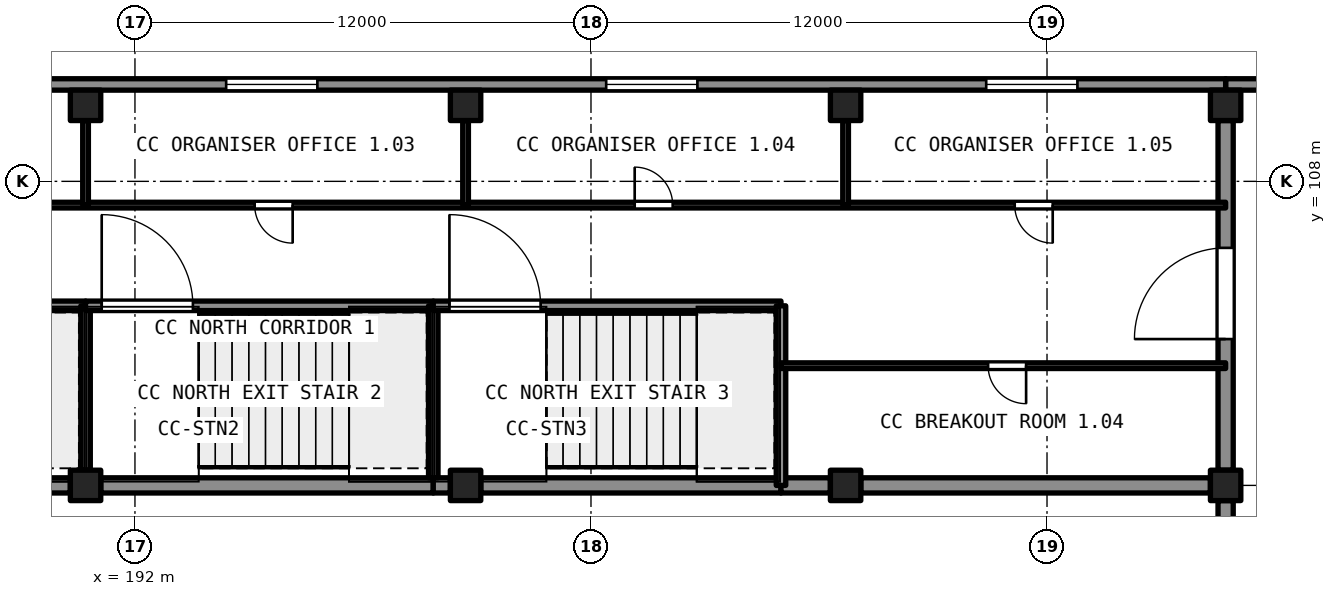
"""IFC4 building model, lengths in metres.
Left out: names, types, materials, properties, quantities, classifications, styles, units other than length and angle.
Written with IfcOpenShell. Run it as: python <this file> out.ifc"""

import sys

from ifc_helpers import new_model, si_unit, direction, frame, frame_2d, origin, origin_2d, place, context, subcontext, project, spatial, rectangle, extrude, element, fill, save


model = new_model("IFC4")
c1 = context("Model", 3, precision=1e-05, world=origin(), true_north=direction((0.0, 1.0)))
c2 = subcontext(c1, "Body", "Model", "MODEL_VIEW")
j1 = project(units=[si_unit("LENGTHUNIT", "METRE"), si_unit("PLANEANGLEUNIT", "RADIAN")], contexts=[c1])
p1 = place(None, origin())
s1 = spatial("IfcSite", under=j1, at=p1, CompositionType="ELEMENT")
p2 = place(p1, origin())
s2 = spatial("IfcBuilding", under=s1, at=p2, CompositionType="ELEMENT")
p3 = place(p2, frame((0.0, 0.0, 9.0)))
s3 = spatial("IfcBuildingStorey", under=s2, at=p3, CompositionType="ELEMENT", Elevation=9.0)
for number, where, z_axis, x_axis in (
    (1, (190.7, 100.0, 0.0), (0.0, 0.0, 1.0), (1.0, 0.0, 0.0)),
    (2, (190.7, 110.0, 0.0), (0.0, 0.0, 1.0), (1.0, 0.0, 0.0)),
    (3, (200.7, 100.0, 0.0), (0.0, 0.0, 1.0), (1.0, 0.0, 0.0)),
    (4, (200.7, 110.0, 0.0), (0.0, 0.0, 1.0), (1.0, 0.0, 0.0)),
    (5, (210.7, 100.0, 0.0), (0.0, 0.0, 1.0), (1.0, 0.0, 0.0)),
    (6, (210.7, 110.0, 0.0), (0.0, 0.0, 1.0), (1.0, 0.0, 0.0)),
    (7, (220.7, 100.0, 0.0), (0.0, 0.0, 1.0), (1.0, 0.0, 0.0)),
    (8, (220.7, 110.0, 0.0), (0.0, 0.0, 1.0), (1.0, 0.0, 0.0)),
):
    element("IfcColumn", number, at=place(p3, frame(where, z_axis=z_axis, x_axis=x_axis)), inside=s3, PredefinedType="COLUMN", context=c2, shape_type="SweptSolid", body=[
        extrude(rectangle(XDim=0.8, YDim=0.8, at=origin_2d()), origin(), (0.0, 0.0, 1.0), 6.0),
    ])
for number, where, z_axis, x_axis in (
    (9, (181.55, 100.0, 0.0), (0.0, 0.0, 1.0), (1.0, 0.0, 0.0)),
    (10, (191.1, 100.0, 0.0), (0.0, 0.0, 1.0), (1.0, 0.0, 0.0)),
):
    element("IfcWall", number, at=place(p3, frame(where, z_axis=z_axis, x_axis=x_axis)), inside=s3, PredefinedType="SHEAR", context=c2, shape_type="SweptSolid", body=[
        extrude(rectangle(XDim=8.75, YDim=0.4, at=frame_2d((4.375, 0.0))), origin(), (0.0, 0.0, 1.0), 5.59),
    ])
p4 = place(p3, frame((199.85, 100.0, 0.0), z_axis=(0.0, 0.0, 1.0), x_axis=(1.0, 0.0, 0.0)))
e11 = element("IfcWall", 11, at=p4, inside=s3, PredefinedType="SHEAR", context=c2, shape_type="SweptSolid", body=[
    extrude(rectangle(XDim=0.45, YDim=0.4, at=frame_2d((0.225, 0.0))), origin(), (0.0, 0.0, 1.0), 5.59),
])
p5 = place(p3, frame((201.1, 100.0, 0.0), z_axis=(0.0, 0.0, 1.0), x_axis=(1.0, 0.0, 0.0)))
e12 = element("IfcWall", 12, at=p5, inside=s3, PredefinedType="SHEAR", context=c2, shape_type="SweptSolid", body=[
    extrude(rectangle(XDim=7.9, YDim=0.4, at=frame_2d((3.95, 0.0))), origin(), (0.0, 0.0, 1.0), 5.59),
])
p6 = place(p3, frame((209.0, 100.0, 0.0), z_axis=(0.0, 0.0, 1.0), x_axis=(1.0, 0.0, 0.0)))
e13 = element("IfcWall", 13, at=p6, inside=s3, PredefinedType="SHEAR", context=c2, shape_type="SweptSolid", body=[
    extrude(rectangle(XDim=1.3, YDim=0.4, at=frame_2d((0.65, 0.0))), origin(), (0.0, 0.0, 1.0), 5.59),
])
p7 = place(p3, frame((211.1, 100.0, 0.0), z_axis=(0.0, 0.0, 1.0), x_axis=(1.0, 0.0, 0.0)))
e14 = element("IfcWall", 14, at=p7, inside=s3, PredefinedType="SHEAR", context=c2, shape_type="SweptSolid", body=[
    extrude(rectangle(XDim=9.2, YDim=0.4, at=frame_2d((4.6, 0.0))), origin(), (0.0, 0.0, 1.0), 5.59),
])
p8 = place(p3, frame((220.7, 90.4, 0.0), z_axis=(0.0, 0.0, 1.0), x_axis=(0.0, 1.0, 0.0)))
e15 = element("IfcWall", 15, at=p8, inside=s3, PredefinedType="SHEAR", context=c2, shape_type="SweptSolid", body=[
    extrude(rectangle(XDim=9.2, YDim=0.4, at=frame_2d((4.6, 0.0))), origin(), (0.0, 0.0, 1.0), 6.0),
])
p9 = place(p3, frame((220.7, 100.4, 0.0), z_axis=(0.0, 0.0, 1.0), x_axis=(0.0, 1.0, 0.0)))
e16 = element("IfcWall", 16, at=p9, inside=s3, PredefinedType="SHEAR", context=c2, shape_type="SweptSolid", body=[
    extrude(rectangle(XDim=9.2, YDim=0.4, at=frame_2d((4.6, 0.0))), origin(), (0.0, 0.0, 1.0), 6.0),
])
p10 = place(p9, frame((3.45, 0.0, 0.0)))
e17 = element("IfcOpeningElement", 17, at=p10, cuts=e16, PredefinedType="OPENING", context=c2, shape_type="SweptSolid", body=[
    extrude(rectangle(XDim=2.4, YDim=2.4, at=frame_2d((1.2, 1.2))), frame((0.0, 0.21, 0.0), z_axis=(0.0, -1.0, 0.0), x_axis=(1.0, 0.0, 0.0)), (0.0, 0.0, 1.0), 0.421),
])
p11 = place(p3, frame((220.7, 110.55, 0.0), z_axis=(0.0, 0.0, 1.0), x_axis=(1.0, 0.0, 0.0)))
e18 = element("IfcWall", 18, at=p11, inside=s3, PredefinedType="SOLIDWALL", context=c2, shape_type="SweptSolid", body=[
    extrude(rectangle(XDim=30.55, YDim=0.3, at=frame_2d((15.275, 0.0))), origin(), (0.0, 0.0, 1.0), 6.0),
])
p12 = place(p3, frame((170.7, 110.55, 0.0), z_axis=(0.0, 0.0, 1.0), x_axis=(1.0, 0.0, 0.0)))
e19 = element("IfcWall", 19, at=p12, inside=s3, PredefinedType="SOLIDWALL", context=c2, shape_type="SweptSolid", body=[
    extrude(rectangle(XDim=50.0, YDim=0.3, at=frame_2d((25.0, 0.0))), origin(), (0.0, 0.0, 1.0), 5.59),
])
p13 = place(p12, frame((3.7, 0.0, 0.9)))
e20 = element("IfcOpeningElement", 20, at=p13, cuts=e19, PredefinedType="OPENING", context=c2, shape_type="SweptSolid", body=[
    extrude(rectangle(XDim=2.4, YDim=1.8, at=frame_2d((1.2, 0.9))), frame((0.0, 0.161, 0.0), z_axis=(0.0, -1.0, 0.0), x_axis=(1.0, 0.0, 0.0)), (0.0, 0.0, 1.0), 0.321),
])
p14 = place(p12, frame((13.7, 0.0, 0.9)))
e21 = element("IfcOpeningElement", 21, at=p14, cuts=e19, PredefinedType="OPENING", context=c2, shape_type="SweptSolid", body=[
    extrude(rectangle(XDim=2.4, YDim=1.8, at=frame_2d((1.2, 0.9))), frame((0.0, 0.161, 0.0), z_axis=(0.0, -1.0, 0.0), x_axis=(1.0, 0.0, 0.0)), (0.0, 0.0, 1.0), 0.321),
])
p15 = place(p12, frame((23.7, 0.0, 0.9)))
e22 = element("IfcOpeningElement", 22, at=p15, cuts=e19, PredefinedType="OPENING", context=c2, shape_type="SweptSolid", body=[
    extrude(rectangle(XDim=2.4, YDim=1.8, at=frame_2d((1.2, 0.9))), frame((0.0, 0.161, 0.0), z_axis=(0.0, -1.0, 0.0), x_axis=(1.0, 0.0, 0.0)), (0.0, 0.0, 1.0), 0.321),
])
p16 = place(p12, frame((33.7, 0.0, 0.9)))
e23 = element("IfcOpeningElement", 23, at=p16, cuts=e19, PredefinedType="OPENING", context=c2, shape_type="SweptSolid", body=[
    extrude(rectangle(XDim=2.4, YDim=1.8, at=frame_2d((1.2, 0.9))), frame((0.0, 0.161, 0.0), z_axis=(0.0, -1.0, 0.0), x_axis=(1.0, 0.0, 0.0)), (0.0, 0.0, 1.0), 0.321),
])
p17 = place(p12, frame((43.7, 0.0, 0.9)))
e24 = element("IfcOpeningElement", 24, at=p17, cuts=e19, PredefinedType="OPENING", context=c2, shape_type="SweptSolid", body=[
    extrude(rectangle(XDim=2.4, YDim=1.8, at=frame_2d((1.2, 0.9))), frame((0.0, 0.161, 0.0), z_axis=(0.0, -1.0, 0.0), x_axis=(1.0, 0.0, 0.0)), (0.0, 0.0, 1.0), 0.321),
])
p18 = place(p3, frame((181.55, 104.725, 0.0), z_axis=(0.0, 0.0, 1.0), x_axis=(1.0, 0.0, 0.0)))
e25 = element("IfcWall", 25, at=p18, inside=s3, PredefinedType="SHEAR", context=c2, shape_type="SweptSolid", body=[
    extrude(rectangle(XDim=9.15, YDim=0.25, at=frame_2d((4.575, 0.0))), origin(), (0.0, 0.0, 1.0), 5.59),
])
p19 = place(p18, frame((0.425, 0.0, 0.0)))
e26 = element("IfcOpeningElement", 26, at=p19, cuts=e25, PredefinedType="OPENING", context=c2, shape_type="SweptSolid", body=[
    extrude(rectangle(XDim=2.4, YDim=2.1, at=frame_2d((1.2, 1.05))), frame((0.0, 0.135, 0.0), z_axis=(0.0, -1.0, 0.0), x_axis=(1.0, 0.0, 0.0)), (0.0, 0.0, 1.0), 0.271),
])
p20 = place(p3, frame((190.7, 100.4, 0.0), z_axis=(0.0, 0.0, 1.0), x_axis=(0.0, 1.0, 0.0)))
e27 = element("IfcWall", 27, at=p20, inside=s3, PredefinedType="SHEAR", context=c2, shape_type="SweptSolid", body=[
    extrude(rectangle(XDim=4.325, YDim=0.25, at=frame_2d((2.163, 0.0))), origin(), (0.0, 0.0, 1.0), 5.59),
])
p21 = place(p3, frame((190.7, 104.725, 0.0), z_axis=(0.0, 0.0, 1.0), x_axis=(1.0, 0.0, 0.0)))
e28 = element("IfcWall", 28, at=p21, inside=s3, PredefinedType="SHEAR", context=c2, shape_type="SweptSolid", body=[
    extrude(rectangle(XDim=9.15, YDim=0.25, at=frame_2d((4.575, 0.0))), origin(), (0.0, 0.0, 1.0), 5.59),
])
p22 = place(p21, frame((0.425, 0.0, 0.0)))
e29 = element("IfcOpeningElement", 29, at=p22, cuts=e28, PredefinedType="OPENING", context=c2, shape_type="SweptSolid", body=[
    extrude(rectangle(XDim=2.4, YDim=2.1, at=frame_2d((1.2, 1.05))), frame((0.0, 0.135, 0.0), z_axis=(0.0, -1.0, 0.0), x_axis=(1.0, 0.0, 0.0)), (0.0, 0.0, 1.0), 0.271),
])
p23 = place(p3, frame((199.85, 100.2, 0.0), z_axis=(0.0, 0.0, 1.0), x_axis=(0.0, 1.0, 0.0)))
e30 = element("IfcWall", 30, at=p23, inside=s3, PredefinedType="SHEAR", context=c2, shape_type="SweptSolid", body=[
    extrude(rectangle(XDim=4.525, YDim=0.25, at=frame_2d((2.263, 0.0))), origin(), (0.0, 0.0, 1.0), 5.59),
])
p24 = place(p3, frame((199.85, 104.725, 0.0), z_axis=(0.0, 0.0, 1.0), x_axis=(1.0, 0.0, 0.0)))
e31 = element("IfcWall", 31, at=p24, inside=s3, PredefinedType="SHEAR", context=c2, shape_type="SweptSolid", body=[
    extrude(rectangle(XDim=9.15, YDim=0.25, at=frame_2d((4.575, 0.0))), origin(), (0.0, 0.0, 1.0), 5.59),
])
p25 = place(p24, frame((0.425, 0.0, 0.0)))
e32 = element("IfcOpeningElement", 32, at=p25, cuts=e31, PredefinedType="OPENING", context=c2, shape_type="SweptSolid", body=[
    extrude(rectangle(XDim=2.4, YDim=2.1, at=frame_2d((1.2, 1.05))), frame((0.0, 0.135, 0.0), z_axis=(0.0, -1.0, 0.0), x_axis=(1.0, 0.0, 0.0)), (0.0, 0.0, 1.0), 0.271),
])
p26 = place(p3, frame((209.0, 100.0, 0.0), z_axis=(0.0, 0.0, 1.0), x_axis=(0.0, 1.0, 0.0)))
e33 = element("IfcWall", 33, at=p26, inside=s3, PredefinedType="SHEAR", context=c2, shape_type="SweptSolid", body=[
    extrude(rectangle(XDim=4.725, YDim=0.25, at=frame_2d((2.363, 0.0))), origin(), (0.0, 0.0, 1.0), 5.59),
])
p27 = place(p3, frame((209.0, 103.15, 0.0), z_axis=(0.0, 0.0, 1.0), x_axis=(1.0, 0.0, 0.0)))
e34 = element("IfcWall", 34, at=p27, inside=s3, PredefinedType="PARTITIONING", context=c2, shape_type="SweptSolid", body=[
    extrude(rectangle(XDim=11.7, YDim=0.15, at=frame_2d((5.85, 0.0))), origin(), (0.0, 0.0, 1.0), 5.59),
])
p28 = place(p27, frame((5.45, 0.0, 0.0)))
e35 = element("IfcOpeningElement", 35, at=p28, cuts=e34, PredefinedType="OPENING", context=c2, shape_type="SweptSolid", body=[
    extrude(rectangle(XDim=1.0, YDim=2.1, at=frame_2d((0.5, 1.05))), frame((0.0, 0.085, 0.0), z_axis=(0.0, -1.0, 0.0), x_axis=(1.0, 0.0, 0.0)), (0.0, 0.0, 1.0), 0.171),
])
p29 = place(p3, frame((220.7, 107.375, 0.0), z_axis=(0.0, 0.0, 1.0), x_axis=(-1.0, 0.0, 0.0)))
e36 = element("IfcWall", 36, at=p29, inside=s3, PredefinedType="PARTITIONING", context=c2, shape_type="SweptSolid", body=[
    extrude(rectangle(XDim=50.0, YDim=0.15, at=frame_2d((25.0, 0.0))), origin(), (0.0, 0.0, 1.0), 5.59),
])
p30 = place(p29, frame((44.55, 0.0, 0.0)))
e37 = element("IfcOpeningElement", 37, at=p30, cuts=e36, PredefinedType="OPENING", context=c2, shape_type="SweptSolid", body=[
    extrude(rectangle(XDim=1.0, YDim=2.1, at=frame_2d((0.5, 1.05))), frame((0.0, 0.085, 0.0), z_axis=(0.0, -1.0, 0.0), x_axis=(1.0, 0.0, 0.0)), (0.0, 0.0, 1.0), 0.171),
])
p31 = place(p29, frame((34.55, 0.0, 0.0)))
e38 = element("IfcOpeningElement", 38, at=p31, cuts=e36, PredefinedType="OPENING", context=c2, shape_type="SweptSolid", body=[
    extrude(rectangle(XDim=1.0, YDim=2.1, at=frame_2d((0.5, 1.05))), frame((0.0, 0.085, 0.0), z_axis=(0.0, -1.0, 0.0), x_axis=(1.0, 0.0, 0.0)), (0.0, 0.0, 1.0), 0.171),
])
p32 = place(p29, frame((24.55, 0.0, 0.0)))
e39 = element("IfcOpeningElement", 39, at=p32, cuts=e36, PredefinedType="OPENING", context=c2, shape_type="SweptSolid", body=[
    extrude(rectangle(XDim=1.0, YDim=2.1, at=frame_2d((0.5, 1.05))), frame((0.0, 0.085, 0.0), z_axis=(0.0, -1.0, 0.0), x_axis=(1.0, 0.0, 0.0)), (0.0, 0.0, 1.0), 0.171),
])
p33 = place(p29, frame((14.55, 0.0, 0.0)))
e40 = element("IfcOpeningElement", 40, at=p33, cuts=e36, PredefinedType="OPENING", context=c2, shape_type="SweptSolid", body=[
    extrude(rectangle(XDim=1.0, YDim=2.1, at=frame_2d((0.5, 1.05))), frame((0.0, 0.085, 0.0), z_axis=(0.0, -1.0, 0.0), x_axis=(1.0, 0.0, 0.0)), (0.0, 0.0, 1.0), 0.171),
])
p34 = place(p29, frame((4.55, 0.0, 0.0)))
e41 = element("IfcOpeningElement", 41, at=p34, cuts=e36, PredefinedType="OPENING", context=c2, shape_type="SweptSolid", body=[
    extrude(rectangle(XDim=1.0, YDim=2.1, at=frame_2d((0.5, 1.05))), frame((0.0, 0.085, 0.0), z_axis=(0.0, -1.0, 0.0), x_axis=(1.0, 0.0, 0.0)), (0.0, 0.0, 1.0), 0.171),
])
for number, where, z_axis, x_axis in (
    (42, (190.7, 107.375, 0.0), (0.0, 0.0, 1.0), (0.0, 1.0, 0.0)),
    (43, (200.7, 107.375, 0.0), (0.0, 0.0, 1.0), (0.0, 1.0, 0.0)),
    (44, (210.7, 107.375, 0.0), (0.0, 0.0, 1.0), (0.0, 1.0, 0.0)),
):
    element("IfcWall", number, at=place(p3, frame(where, z_axis=z_axis, x_axis=x_axis)), inside=s3, PredefinedType="PARTITIONING", context=c2, shape_type="SweptSolid", body=[
        extrude(rectangle(XDim=2.225, YDim=0.15, at=frame_2d((1.113, 0.0))), origin(), (0.0, 0.0, 1.0), 5.59),
    ])
p35 = place(p10, origin())
e45 = element("IfcDoor", 45, at=p35, inside=s3, OperationType="DOUBLE_DOOR_SINGLE_SWING", PredefinedType="DOOR", context=c2, shape_type="SweptSolid", body=[
    extrude(rectangle(XDim=2.4, YDim=2.4, at=frame_2d((1.2, 1.2))), frame((0.0, 0.025, 0.0), z_axis=(0.0, -1.0, 0.0), x_axis=(1.0, 0.0, 0.0)), (0.0, 0.0, 1.0), 0.05),
])
fill(e17, e45)
p36 = place(p28, origin())
e46 = element("IfcDoor", 46, at=p36, inside=s3, OperationType="SINGLE_SWING_RIGHT", PredefinedType="DOOR", context=c2, shape_type="SweptSolid", body=[
    extrude(rectangle(XDim=1.0, YDim=2.1, at=frame_2d((0.5, 1.05))), frame((0.0, 0.025, 0.0), z_axis=(0.0, -1.0, 0.0), x_axis=(1.0, 0.0, 0.0)), (0.0, 0.0, 1.0), 0.05),
])
fill(e35, e46)
p37 = place(p32, origin())
e47 = element("IfcDoor", 47, at=p37, inside=s3, OperationType="SINGLE_SWING_LEFT", PredefinedType="DOOR", context=c2, shape_type="SweptSolid", body=[
    extrude(rectangle(XDim=1.0, YDim=2.1, at=frame_2d((0.5, 1.05))), frame((0.0, 0.025, 0.0), z_axis=(0.0, -1.0, 0.0), x_axis=(1.0, 0.0, 0.0)), (0.0, 0.0, 1.0), 0.05),
])
fill(e39, e47)
p38 = place(p33, origin())
e48 = element("IfcDoor", 48, at=p38, inside=s3, OperationType="SINGLE_SWING_RIGHT", PredefinedType="DOOR", context=c2, shape_type="SweptSolid", body=[
    extrude(rectangle(XDim=1.0, YDim=2.1, at=frame_2d((0.5, 1.05))), frame((0.0, 0.025, 0.0), z_axis=(0.0, -1.0, 0.0), x_axis=(1.0, 0.0, 0.0)), (0.0, 0.0, 1.0), 0.05),
])
fill(e40, e48)
p39 = place(p34, origin())
e49 = element("IfcDoor", 49, at=p39, inside=s3, OperationType="SINGLE_SWING_LEFT", PredefinedType="DOOR", context=c2, shape_type="SweptSolid", body=[
    extrude(rectangle(XDim=1.0, YDim=2.1, at=frame_2d((0.5, 1.05))), frame((0.0, 0.025, 0.0), z_axis=(0.0, -1.0, 0.0), x_axis=(1.0, 0.0, 0.0)), (0.0, 0.0, 1.0), 0.05),
])
fill(e41, e49)
p40 = place(p22, origin())
e50 = element("IfcDoor", 50, at=p40, inside=s3, OperationType="DOUBLE_DOOR_SINGLE_SWING", PredefinedType="DOOR", context=c2, shape_type="SweptSolid", body=[
    extrude(rectangle(XDim=2.4, YDim=2.1, at=frame_2d((1.2, 1.05))), frame((0.0, 0.025, 0.0), z_axis=(0.0, -1.0, 0.0), x_axis=(1.0, 0.0, 0.0)), (0.0, 0.0, 1.0), 0.05),
])
fill(e29, e50)
p41 = place(p25, origin())
e51 = element("IfcDoor", 51, at=p41, inside=s3, OperationType="DOUBLE_DOOR_SINGLE_SWING", PredefinedType="DOOR", context=c2, shape_type="SweptSolid", body=[
    extrude(rectangle(XDim=2.4, YDim=2.1, at=frame_2d((1.2, 1.05))), frame((0.0, 0.025, 0.0), z_axis=(0.0, -1.0, 0.0), x_axis=(1.0, 0.0, 0.0)), (0.0, 0.0, 1.0), 0.05),
])
fill(e32, e51)
p42 = place(p15, origin())
e52 = element("IfcWindow", 52, at=p42, inside=s3, PartitioningType="DOUBLE_PANEL_VERTICAL", PredefinedType="WINDOW", context=c2, shape_type="SweptSolid", body=[
    extrude(rectangle(XDim=2.4, YDim=1.8, at=frame_2d((1.2, 0.9))), frame((0.0, 0.03, 0.0), z_axis=(0.0, -1.0, 0.0), x_axis=(1.0, 0.0, 0.0)), (0.0, 0.0, 1.0), 0.06),
])
fill(e22, e52)
p43 = place(p16, origin())
e53 = element("IfcWindow", 53, at=p43, inside=s3, PartitioningType="DOUBLE_PANEL_VERTICAL", PredefinedType="WINDOW", context=c2, shape_type="SweptSolid", body=[
    extrude(rectangle(XDim=2.4, YDim=1.8, at=frame_2d((1.2, 0.9))), frame((0.0, 0.03, 0.0), z_axis=(0.0, -1.0, 0.0), x_axis=(1.0, 0.0, 0.0)), (0.0, 0.0, 1.0), 0.06),
])
fill(e23, e53)
p44 = place(p17, origin())
e54 = element("IfcWindow", 54, at=p44, inside=s3, PartitioningType="DOUBLE_PANEL_VERTICAL", PredefinedType="WINDOW", context=c2, shape_type="SweptSolid", body=[
    extrude(rectangle(XDim=2.4, YDim=1.8, at=frame_2d((1.2, 0.9))), frame((0.0, 0.03, 0.0), z_axis=(0.0, -1.0, 0.0), x_axis=(1.0, 0.0, 0.0)), (0.0, 0.0, 1.0), 0.06),
])
fill(e24, e54)
save(model, sys.argv[1])
